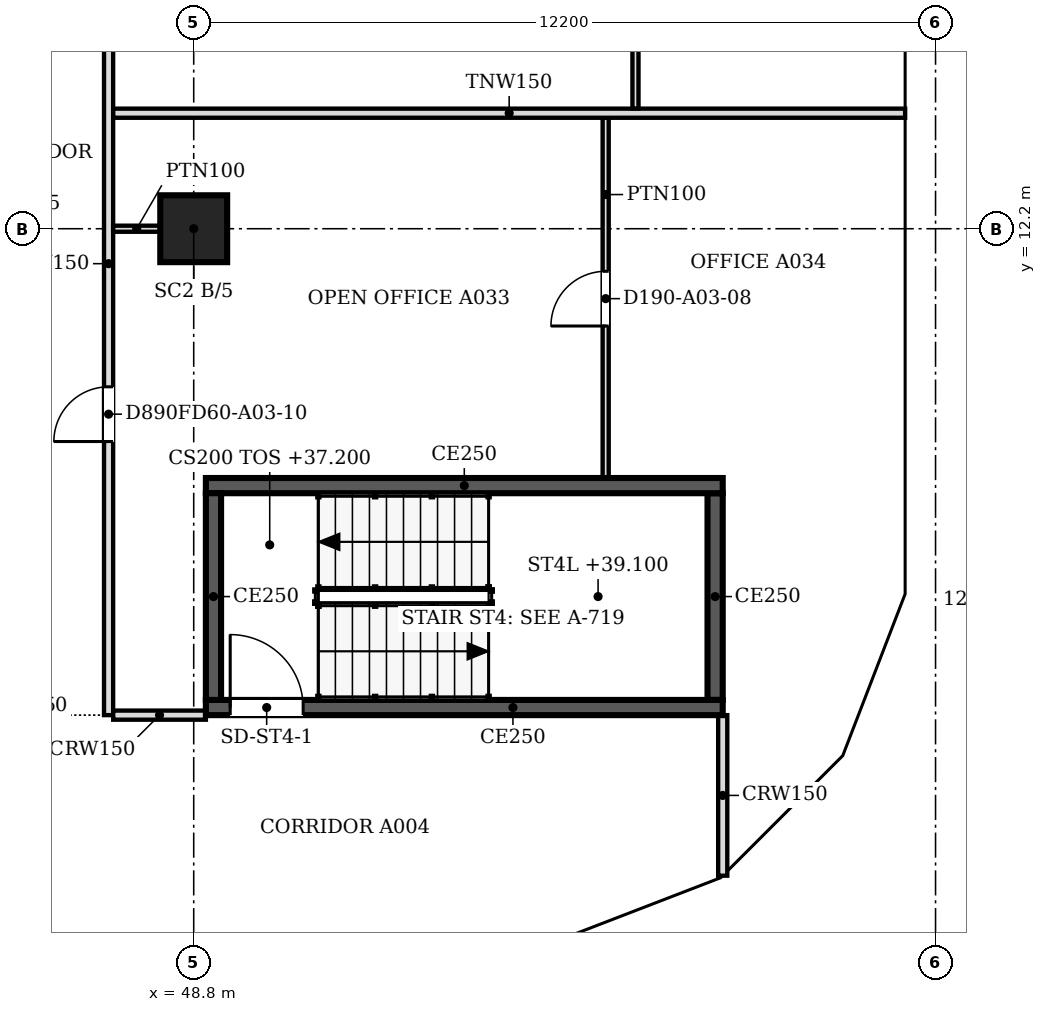
"""IFC4 building model, lengths in metres.
Left out: names, types, materials, properties, quantities, classifications, styles, units other than length and angle.
Written with IfcOpenShell. Run it as: python <this file> out.ifc"""

import sys

from ifc_helpers import new_model, si_unit, direction, frame, frame_2d, origin, origin_2d, place, context, subcontext, project, spatial, polyline, rectangle, outline, extrude, faceted_brep, source, transform, mapped, element, fill, save


model = new_model("IFC4")
c1 = context("Model", 3, precision=1e-05, world=origin(), true_north=direction((0.0, 1.0)))
c2 = subcontext(c1, "Body", "Model", "MODEL_VIEW")
j1 = project(units=[si_unit("LENGTHUNIT", "METRE"), si_unit("PLANEANGLEUNIT", "RADIAN")], contexts=[c1])
p1 = place(None, origin())
s1 = spatial("IfcSite", under=j1, at=p1, CompositionType="ELEMENT")
p2 = place(p1, origin())
s2 = spatial("IfcBuilding", under=s1, at=p2, CompositionType="ELEMENT")
p3 = place(p2, frame((0.0, 0.0, 37.2)))
s3 = spatial("IfcBuildingStorey", under=s2, at=p3, CompositionType="ELEMENT", Elevation=37.2)
p4 = place(p3, frame((48.8, 12.2, 0.0), z_axis=(0.0, 0.0, 1.0), x_axis=(1.0, 0.0, 0.0)))
e1 = element("IfcColumn", 1, at=p4, inside=s3, PredefinedType="COLUMN", context=c2, shape_type="SweptSolid", body=[
    extrude(rectangle(XDim=1.1, YDim=1.1, at=origin_2d()), origin(), (0.0, 0.0, 1.0), 3.6),
])
m1 = source(origin(), c2, "Body", "Brep", [
    faceted_brep([(2.95, -0.25, 0.0), (3.003, -0.25, 0.068), (3.003, -0.25, 7.532), (2.95, -0.25, 7.6), (0.0, -0.25, 3.8), (0.047, 0.25, 3.86), (2.898, 0.25, 7.532), (2.898, 0.25, 0.068), (0.047, 0.25, 3.74), (2.95, 0.0, 0.0), (2.95, 0.0, 7.6), (0.0, 0.0, 3.8)], [[[0, 1, 2, 3, 4]], [[5, 6, 7, 8]], [[1, 0, 9]], [[10, 3, 2]], [[6, 5, 11, 4, 3, 10]], [[8, 7, 9, 0, 4, 11]], [[8, 11, 5]], [[1, 9, 7, 6, 10, 2]]]),
])
p5 = place(p3, frame((54.854, 0.25, -3.8), z_axis=(0.0, 0.0, 1.0), x_axis=(0.932970071518, 0.359953949349, 0.0)))
e2 = element("IfcWall", 2, at=p5, inside=s3, PredefinedType="SOLIDWALL", context=c2, shape_type="MappedRepresentation", body=[
    mapped(m1, transform((0.0, 0.0, 0.0), scale=1.0)),
])
m2 = source(origin(), c2, "Body", "SweptSolid", [
    extrude(outline(polyline([(2.75, 6.935), (0.316, 3.8), (2.75, 0.665), (2.75, 6.935)])), frame((0.0, 0.26, 0.0), z_axis=(0.0, -1.0, 0.0), x_axis=(1.0, 0.0, 0.0)), (0.0, 0.0, 1.0), 0.52),
])
p6 = place(p5, origin())
e3 = element("IfcOpeningElement", 3, at=p6, cuts=e2, PredefinedType="OPENING", context=c2, shape_type="MappedRepresentation", body=[
    mapped(m2, transform((0.0, 0.0, 0.0), scale=1.0)),
])
m3 = source(origin(), c2, "Body", "Brep", [
    faceted_brep([(0.053, -0.25, 0.0), (2.997, -0.25, 3.8), (0.053, -0.25, 7.6), (0.0, -0.25, 7.532), (0.0, -0.25, 0.068), (0.106, 0.25, 7.532), (2.944, 0.25, 3.868), (2.944, 0.25, 3.732), (0.106, 0.25, 0.068), (2.997, 0.0, 3.8), (0.053, 0.0, 0.0), (0.053, 0.0, 7.6)], [[[0, 1, 2, 3, 4]], [[5, 6, 7, 8]], [[8, 7, 9, 1, 0, 10]], [[6, 5, 11, 2, 1, 9]], [[3, 2, 11]], [[10, 0, 4]], [[8, 10, 4, 3, 11, 5]], [[9, 7, 6]]]),
])
p7 = place(p3, frame((57.569, 1.274, -3.8), z_axis=(0.0, 0.0, 1.0), x_axis=(0.707066050402, 0.707147509625, 0.0)))
e4 = element("IfcWall", 4, at=p7, inside=s3, PredefinedType="SOLIDWALL", context=c2, shape_type="MappedRepresentation", body=[
    mapped(m3, transform((0.0, 0.0, 0.0), scale=1.0)),
])
m4 = source(origin(), c2, "Body", "SweptSolid", [
    extrude(outline(polyline([(0.253, 0.667), (2.681, 3.8), (0.253, 6.934), (0.253, 0.667)])), frame((0.0, 0.26, 0.0), z_axis=(0.0, -1.0, 0.0), x_axis=(1.0, 0.0, 0.0)), (0.0, 0.0, 1.0), 0.52),
])
p8 = place(p7, origin())
e5 = element("IfcOpeningElement", 5, at=p8, cuts=e4, PredefinedType="OPENING", context=c2, shape_type="MappedRepresentation", body=[
    mapped(m4, transform((0.0, 0.0, 0.0), scale=1.0)),
])
m5 = source(origin(), c2, "Body", "Brep", [
    faceted_brep([(2.95, -0.25, 0.0), (2.997, -0.25, 0.059), (2.997, -0.25, 7.541), (2.95, -0.25, 7.6), (0.0, -0.25, 3.8), (0.053, 0.25, 3.868), (2.904, 0.25, 7.54), (2.904, 0.25, 0.06), (0.053, 0.25, 3.732), (2.95, 0.0, 0.0), (2.95, 0.0, 7.6), (0.0, 0.0, 3.8)], [[[0, 1, 2, 3, 4]], [[5, 6, 7, 8]], [[1, 0, 9]], [[10, 3, 2]], [[6, 5, 11, 4, 3, 10]], [[8, 7, 9, 0, 4, 11]], [[8, 11, 5]], [[1, 9, 7, 6, 10, 2]]]),
])
p9 = place(p3, frame((59.688, 3.394, -3.8), z_axis=(0.0, 0.0, 1.0), x_axis=(0.359972353723, 0.932962970624, 0.0)))
e6 = element("IfcWall", 6, at=p9, inside=s3, PredefinedType="SOLIDWALL", context=c2, shape_type="MappedRepresentation", body=[
    mapped(m5, transform((0.0, 0.0, 0.0), scale=1.0)),
])
p10 = place(p9, origin())
e7 = element("IfcOpeningElement", 7, at=p10, cuts=e6, PredefinedType="OPENING", context=c2, shape_type="MappedRepresentation", body=[
    mapped(m2, transform((0.0, 0.0, 0.0), scale=1.0)),
])
m6 = source(origin(), c2, "Body", "Brep", [
    faceted_brep([(0.047, -0.25, 0.0), (3.05, -0.25, 3.8), (0.047, -0.25, 7.6), (0.0, -0.25, 7.54), (0.0, -0.25, 0.06), (0.093, 0.25, 7.541), (3.05, 0.25, 3.8), (0.093, 0.25, 0.059), (0.047, 0.0, 0.0), (0.047, 0.0, 7.6)], [[[0, 1, 2, 3, 4]], [[5, 6, 7]], [[7, 6, 1, 0, 8]], [[6, 5, 9, 2, 1]], [[3, 2, 9]], [[8, 0, 4]], [[7, 8, 4, 3, 9, 5]]]),
])
p11 = place(p3, frame((60.75, 6.1, -3.8), z_axis=(0.0, 0.0, 1.0), x_axis=(0.0, 1.0, 0.0)))
e8 = element("IfcWall", 8, at=p11, inside=s3, PredefinedType="SOLIDWALL", context=c2, shape_type="MappedRepresentation", body=[
    mapped(m6, transform((0.0, 0.0, 0.0), scale=1.0)),
])
m7 = source(origin(), c2, "Body", "SweptSolid", [
    extrude(outline(polyline([(0.247, 0.656), (2.731, 3.8), (0.247, 6.944), (0.247, 0.656)])), frame((0.0, 0.26, 0.0), z_axis=(0.0, -1.0, 0.0), x_axis=(1.0, 0.0, 0.0)), (0.0, 0.0, 1.0), 0.52),
])
p12 = place(p11, origin())
e9 = element("IfcOpeningElement", 9, at=p12, cuts=e8, PredefinedType="OPENING", context=c2, shape_type="MappedRepresentation", body=[
    mapped(m7, transform((0.0, 0.0, 0.0), scale=1.0)),
])
m8 = source(origin(), c2, "Body", "SweptSolid", [
    extrude(outline(polyline([(3.05, 0.0), (6.1, 3.8), (3.05, 7.6), (0.0, 3.8), (3.05, 0.0)])), frame((0.0, 0.25, 0.0), z_axis=(0.0, -1.0, 0.0), x_axis=(1.0, 0.0, 0.0)), (0.0, 0.0, 1.0), 0.5),
])
p13 = place(p3, frame((60.75, 9.15, -3.8), z_axis=(0.0, 0.0, 1.0), x_axis=(0.0, 1.0, 0.0)))
e10 = element("IfcWall", 10, at=p13, inside=s3, PredefinedType="SOLIDWALL", context=c2, shape_type="MappedRepresentation", body=[
    mapped(m8, transform((0.0, 0.0, 0.0), scale=1.0)),
])
m9 = source(origin(), c2, "Body", "SweptSolid", [
    extrude(outline(polyline([(3.05, 0.399), (5.78, 3.8), (3.05, 7.201), (0.321, 3.8), (3.05, 0.399)])), frame((0.0, 0.26, 0.0), z_axis=(0.0, -1.0, 0.0), x_axis=(1.0, 0.0, 0.0)), (0.0, 0.0, 1.0), 0.52),
])
p14 = place(p13, origin())
e11 = element("IfcOpeningElement", 11, at=p14, cuts=e10, PredefinedType="OPENING", context=c2, shape_type="MappedRepresentation", body=[
    mapped(m9, transform((0.0, 0.0, 0.0), scale=1.0)),
])
p15 = place(p2, frame((0.0, 0.0, 41.0)))
s4 = spatial("IfcBuildingStorey", under=s2, at=p15, CompositionType="ELEMENT", Elevation=41.0)
m10 = source(origin(), c2, "Body", "Brep", [
    faceted_brep([(0.047, -0.25, 0.0), (2.997, -0.25, 3.8), (0.047, -0.25, 7.6), (0.0, -0.25, 7.541), (0.0, -0.25, 0.059), (0.093, 0.25, 7.54), (2.944, 0.25, 3.868), (2.944, 0.25, 3.732), (0.093, 0.25, 0.06), (2.997, 0.0, 3.8), (0.047, 0.0, 0.0), (0.047, 0.0, 7.6)], [[[0, 1, 2, 3, 4]], [[5, 6, 7, 8]], [[8, 7, 9, 1, 0, 10]], [[6, 5, 11, 2, 1, 9]], [[3, 2, 11]], [[10, 0, 4]], [[8, 10, 4, 3, 11, 5]], [[9, 7, 6]]]),
])
p16 = place(p15, frame((54.81, 0.233, -3.8), z_axis=(0.0, 0.0, 1.0), x_axis=(0.932990326376, 0.359901446078, 0.0)))
e12 = element("IfcWall", 12, at=p16, inside=s4, PredefinedType="SOLIDWALL", context=c2, shape_type="MappedRepresentation", body=[
    mapped(m10, transform((0.0, 0.0, 0.0), scale=1.0)),
])
m11 = source(origin(), c2, "Body", "SweptSolid", [
    extrude(outline(polyline([(0.247, 0.665), (2.681, 3.8), (0.247, 6.935), (0.247, 0.665)])), frame((0.0, 0.26, 0.0), z_axis=(0.0, -1.0, 0.0), x_axis=(1.0, 0.0, 0.0)), (0.0, 0.0, 1.0), 0.52),
])
p17 = place(p16, origin())
e13 = element("IfcOpeningElement", 13, at=p17, cuts=e12, PredefinedType="OPENING", context=c2, shape_type="MappedRepresentation", body=[
    mapped(m11, transform((0.0, 0.0, 0.0), scale=1.0)),
])
m12 = source(origin(), c2, "Body", "Brep", [
    faceted_brep([(2.944, -0.25, 0.0), (2.997, -0.25, 0.068), (2.997, -0.25, 7.532), (2.944, -0.25, 7.6), (0.0, -0.25, 3.8), (0.053, 0.25, 3.868), (2.891, 0.25, 7.532), (2.891, 0.25, 0.068), (0.053, 0.25, 3.732), (2.944, 0.0, 0.0), (2.944, 0.0, 7.6), (0.0, 0.0, 3.8)], [[[0, 1, 2, 3, 4]], [[5, 6, 7, 8]], [[1, 0, 9]], [[10, 3, 2]], [[6, 5, 11, 4, 3, 10]], [[8, 7, 9, 0, 4, 11]], [[8, 11, 5]], [[1, 9, 7, 6, 10, 2]]]),
])
p18 = place(p15, frame((57.606, 1.312, -3.8), z_axis=(0.0, 0.0, 1.0), x_axis=(0.707147509625, 0.707066050402, 0.0)))
e14 = element("IfcWall", 14, at=p18, inside=s4, PredefinedType="SOLIDWALL", context=c2, shape_type="MappedRepresentation", body=[
    mapped(m12, transform((0.0, 0.0, 0.0), scale=1.0)),
])
m13 = source(origin(), c2, "Body", "SweptSolid", [
    extrude(outline(polyline([(2.744, 6.934), (0.316, 3.8), (2.744, 0.666), (2.744, 6.934)])), frame((0.0, 0.26, 0.0), z_axis=(0.0, -1.0, 0.0), x_axis=(1.0, 0.0, 0.0)), (0.0, 0.0, 1.0), 0.52),
])
p19 = place(p18, origin())
e15 = element("IfcOpeningElement", 15, at=p19, cuts=e14, PredefinedType="OPENING", context=c2, shape_type="MappedRepresentation", body=[
    mapped(m13, transform((0.0, 0.0, 0.0), scale=1.0)),
])
m14 = source(origin(), c2, "Body", "Brep", [
    faceted_brep([(0.053, -0.25, 0.0), (3.003, -0.25, 3.8), (0.053, -0.25, 7.6), (0.0, -0.25, 7.532), (0.0, -0.25, 0.068), (0.106, 0.25, 7.532), (2.957, 0.25, 3.86), (2.957, 0.25, 3.74), (0.106, 0.25, 0.068), (3.003, 0.0, 3.8), (0.053, 0.0, 0.0), (0.053, 0.0, 7.6)], [[[0, 1, 2, 3, 4]], [[5, 6, 7, 8]], [[8, 7, 9, 1, 0, 10]], [[6, 5, 11, 2, 1, 9]], [[3, 2, 11]], [[10, 0, 4]], [[8, 10, 4, 3, 11, 5]], [[9, 7, 6]]]),
])
p20 = place(p15, frame((59.669, 3.344, -3.8), z_axis=(0.0, 0.0, 1.0), x_axis=(0.35992665181, 0.932980602862, 0.0)))
e16 = element("IfcWall", 16, at=p20, inside=s4, PredefinedType="SOLIDWALL", context=c2, shape_type="MappedRepresentation", body=[
    mapped(m14, transform((0.0, 0.0, 0.0), scale=1.0)),
])
m15 = source(origin(), c2, "Body", "SweptSolid", [
    extrude(outline(polyline([(0.253, 0.665), (2.687, 3.8), (0.253, 6.935), (0.253, 0.665)])), frame((0.0, 0.26, 0.0), z_axis=(0.0, -1.0, 0.0), x_axis=(1.0, 0.0, 0.0)), (0.0, 0.0, 1.0), 0.52),
])
p21 = place(p20, origin())
e17 = element("IfcOpeningElement", 17, at=p21, cuts=e16, PredefinedType="OPENING", context=c2, shape_type="MappedRepresentation", body=[
    mapped(m15, transform((0.0, 0.0, 0.0), scale=1.0)),
])
m16 = source(origin(), c2, "Body", "Brep", [
    faceted_brep([(3.003, -0.25, 0.0), (6.053, -0.25, 3.8), (3.003, -0.25, 7.6), (0.0, -0.25, 3.8), (0.047, 0.25, 3.859), (3.003, 0.25, 7.6), (6.053, 0.25, 3.8), (3.003, 0.25, 0.0), (0.047, 0.25, 3.741), (0.0, 0.0, 3.8)], [[[0, 1, 2, 3]], [[4, 5, 6, 7, 8]], [[7, 6, 1, 0]], [[6, 5, 2, 1]], [[5, 4, 9, 3, 2]], [[8, 7, 0, 3, 9]], [[8, 9, 4]]]),
])
p22 = place(p15, frame((60.75, 6.146, -3.8), z_axis=(0.0, 0.0, 1.0), x_axis=(0.0, 1.0, 0.0)))
e18 = element("IfcWall", 18, at=p22, inside=s4, PredefinedType="SOLIDWALL", context=c2, shape_type="MappedRepresentation", body=[
    mapped(m16, transform((0.0, 0.0, 0.0), scale=1.0)),
])
m17 = source(origin(), c2, "Body", "SweptSolid", [
    extrude(outline(polyline([(3.005, 0.401), (5.733, 3.8), (3.005, 7.199), (0.319, 3.8), (3.005, 0.401)])), frame((0.0, 0.26, 0.0), z_axis=(0.0, -1.0, 0.0), x_axis=(1.0, 0.0, 0.0)), (0.0, 0.0, 1.0), 0.52),
])
p23 = place(p22, origin())
e19 = element("IfcOpeningElement", 19, at=p23, cuts=e18, PredefinedType="OPENING", context=c2, shape_type="MappedRepresentation", body=[
    mapped(m17, transform((0.0, 0.0, 0.0), scale=1.0)),
])
p24 = place(p15, frame((60.75, 12.2, -3.8), z_axis=(0.0, 0.0, 1.0), x_axis=(0.0, 1.0, 0.0)))
e20 = element("IfcWall", 20, at=p24, inside=s4, PredefinedType="SOLIDWALL", context=c2, shape_type="MappedRepresentation", body=[
    mapped(m8, transform((0.0, 0.0, 0.0), scale=1.0)),
])
p25 = place(p24, origin())
e21 = element("IfcOpeningElement", 21, at=p25, cuts=e20, PredefinedType="OPENING", context=c2, shape_type="MappedRepresentation", body=[
    mapped(m9, transform((0.0, 0.0, 0.0), scale=1.0)),
])
p26 = place(p3, frame((57.5, 4.325, 0.0), z_axis=(0.0, 0.0, 1.0), x_axis=(-1.0, 0.0, 0.0)))
e22 = element("IfcWall", 22, at=p26, inside=s3, PredefinedType="SOLIDWALL", context=c2, shape_type="SweptSolid", body=[
    extrude(rectangle(XDim=8.5, YDim=0.25, at=frame_2d((4.25, 0.0))), origin(), (0.0, 0.0, 1.0), 3.8),
])
m18 = source(origin(), c2, "Body", "SweptSolid", [
    extrude(rectangle(XDim=1.2, YDim=2.1, at=frame_2d((0.6, 1.05))), frame((0.0, 0.135, 0.0), z_axis=(0.0, -1.0, 0.0), x_axis=(1.0, 0.0, 0.0)), (0.0, 0.0, 1.0), 0.27),
])
p27 = place(p26, frame((6.9, 0.0, 0.0)))
e23 = element("IfcOpeningElement", 23, at=p27, cuts=e22, PredefinedType="OPENING", context=c2, shape_type="MappedRepresentation", body=[
    mapped(m18, transform((0.0, 0.0, 0.0), scale=1.0)),
])
p28 = place(p3, frame((49.125, 4.45, 0.0), z_axis=(0.0, 0.0, 1.0), x_axis=(0.0, 1.0, 0.0)))
e24 = element("IfcWall", 24, at=p28, inside=s3, PredefinedType="SOLIDWALL", context=c2, shape_type="SweptSolid", body=[
    extrude(rectangle(XDim=3.4, YDim=0.25, at=frame_2d((1.7, 0.0))), origin(), (0.0, 0.0, 1.0), 3.8),
])
p29 = place(p3, frame((49.0, 7.975, 0.0), z_axis=(0.0, 0.0, 1.0), x_axis=(1.0, 0.0, 0.0)))
e25 = element("IfcWall", 25, at=p29, inside=s3, PredefinedType="SOLIDWALL", context=c2, shape_type="SweptSolid", body=[
    extrude(rectangle(XDim=8.5, YDim=0.25, at=frame_2d((4.25, 0.0))), origin(), (0.0, 0.0, 1.0), 3.8),
])
p30 = place(p3, frame((57.375, 7.85, 0.0), z_axis=(0.0, 0.0, 1.0), x_axis=(0.0, -1.0, 0.0)))
e26 = element("IfcWall", 26, at=p30, inside=s3, PredefinedType="SOLIDWALL", context=c2, shape_type="SweptSolid", body=[
    extrude(rectangle(XDim=3.4, YDim=0.25, at=frame_2d((1.7, 0.0))), origin(), (0.0, 0.0, 1.0), 3.8),
])
p31 = place(p3, frame((57.5, 1.559, 0.0), z_axis=(0.0, 0.0, 1.0), x_axis=(0.0, 1.0, 0.0)))
e27 = element("IfcWall", 27, at=p31, inside=s3, PredefinedType="PARTITIONING", context=c2, shape_type="SweptSolid", body=[
    extrude(rectangle(XDim=2.641, YDim=0.15, at=frame_2d((1.32, 0.0))), origin(), (0.0, 0.0, 1.0), 3.067),
])
p32 = place(p3, frame((47.4, 22.224, 0.0), z_axis=(0.0, 0.0, 1.0), x_axis=(0.0, -1.0, 0.0)))
e28 = element("IfcWall", 28, at=p32, inside=s3, PredefinedType="PARTITIONING", context=c2, shape_type="SweptSolid", body=[
    extrude(rectangle(XDim=18.024, YDim=0.15, at=frame_2d((9.012, 0.0))), origin(), (0.0, 0.0, 1.0), 3.067),
])
m19 = source(origin(), c2, "Body", "SweptSolid", [
    extrude(rectangle(XDim=0.9, YDim=2.1, at=frame_2d((0.45, 1.05))), frame((0.0, 0.085, 0.0), z_axis=(0.0, -1.0, 0.0), x_axis=(1.0, 0.0, 0.0)), (0.0, 0.0, 1.0), 0.17),
])
p33 = place(p32, frame((3.623, 0.0, 0.0)))
e29 = element("IfcOpeningElement", 29, at=p33, cuts=e28, PredefinedType="OPENING", context=c2, shape_type="MappedRepresentation", body=[
    mapped(m19, transform((0.0, 0.0, 0.0), scale=1.0)),
])
p34 = place(p32, frame((12.624, 0.0, 0.0)))
e30 = element("IfcOpeningElement", 30, at=p34, cuts=e28, PredefinedType="OPENING", context=c2, shape_type="MappedRepresentation", body=[
    mapped(m19, transform((0.0, 0.0, 0.0), scale=1.0)),
])
p35 = place(p3, frame((47.476, 4.2, 0.0), z_axis=(0.0, 0.0, 1.0), x_axis=(1.0, 0.0, 0.0)))
e31 = element("IfcWall", 31, at=p35, inside=s3, PredefinedType="PARTITIONING", context=c2, shape_type="SweptSolid", body=[
    extrude(rectangle(XDim=1.524, YDim=0.15, at=frame_2d((0.762, 0.0))), origin(), (0.0, 0.0, 1.0), 3.067),
])
p36 = place(p3, frame((55.575, 14.024, 0.0), z_axis=(0.0, 0.0, 1.0), x_axis=(0.0, -1.0, 0.0)))
e32 = element("IfcWall", 32, at=p36, inside=s3, PredefinedType="PARTITIONING", context=c2, shape_type="SweptSolid", body=[
    extrude(rectangle(XDim=5.924, YDim=0.1, at=frame_2d((2.962, 0.0))), origin(), (0.0, 0.0, 1.0), 3.067),
])
m20 = source(origin(), c2, "Body", "SweptSolid", [
    extrude(rectangle(XDim=0.9, YDim=2.1, at=frame_2d((0.45, 1.05))), frame((0.0, 0.06, 0.0), z_axis=(0.0, -1.0, 0.0), x_axis=(1.0, 0.0, 0.0)), (0.0, 0.0, 1.0), 0.12),
])
p37 = place(p36, frame((2.524, 0.0, 0.0)))
e33 = element("IfcOpeningElement", 33, at=p37, cuts=e32, PredefinedType="OPENING", context=c2, shape_type="MappedRepresentation", body=[
    mapped(m20, transform((0.0, 0.0, 0.0), scale=1.0)),
])
p38 = place(p3, frame((48.25, 12.2, 0.0), z_axis=(0.0, 0.0, 1.0), x_axis=(-1.0, 0.0, 0.0)))
e34 = element("IfcWall", 34, at=p38, inside=s3, PredefinedType="PARTITIONING", context=c2, shape_type="SweptSolid", body=[
    extrude(rectangle(XDim=0.775, YDim=0.1, at=frame_2d((0.387, 0.0))), origin(), (0.0, 0.0, 1.0), 3.067),
])
p39 = place(p3, frame((47.476, 14.1, 0.0), z_axis=(0.0, 0.0, 1.0), x_axis=(1.0, 0.0, 0.0)))
e35 = element("IfcWall", 35, at=p39, inside=s3, PredefinedType="PARTITIONING", context=c2, shape_type="SweptSolid", body=[
    extrude(rectangle(XDim=13.024, YDim=0.15, at=frame_2d((6.512, 0.0))), origin(), (0.0, 0.0, 1.0), 3.067),
])
p40 = place(p3, frame((56.065, 22.224, 0.0), z_axis=(0.0, 0.0, 1.0), x_axis=(0.0, -1.0, 0.0)))
e36 = element("IfcWall", 36, at=p40, inside=s3, PredefinedType="PARTITIONING", context=c2, shape_type="SweptSolid", body=[
    extrude(rectangle(XDim=8.048, YDim=0.1, at=frame_2d((4.024, 0.0))), origin(), (0.0, 0.0, 1.0), 3.067),
])
p41 = place(p40, frame((3.548, 0.0, 0.0)))
e37 = element("IfcOpeningElement", 37, at=p41, cuts=e36, PredefinedType="OPENING", context=c2, shape_type="MappedRepresentation", body=[
    mapped(m20, transform((0.0, 0.0, 0.0), scale=1.0)),
])
m21 = source(origin(), c2, "Body", "SweptSolid", [
    extrude(rectangle(XDim=1.2, YDim=2.1, at=frame_2d((0.6, 1.05))), frame((0.0, 0.025, 0.0), z_axis=(0.0, -1.0, 0.0), x_axis=(1.0, 0.0, 0.0)), (0.0, 0.0, 1.0), 0.05),
])
p42 = place(p27, origin())
e38 = element("IfcDoor", 38, at=p42, inside=s3, OperationType="SINGLE_SWING_RIGHT", PredefinedType="DOOR", context=c2, shape_type="MappedRepresentation", body=[
    mapped(m21, transform((0.0, 0.0, 0.0), scale=1.0)),
])
fill(e23, e38)
m22 = source(origin(), c2, "Body", "SweptSolid", [
    extrude(rectangle(XDim=0.9, YDim=2.1, at=frame_2d((0.45, 1.05))), frame((0.0, 0.025, 0.0), z_axis=(0.0, -1.0, 0.0), x_axis=(1.0, 0.0, 0.0)), (0.0, 0.0, 1.0), 0.05),
])
p43 = place(p37, origin())
e39 = element("IfcDoor", 39, at=p43, inside=s3, OperationType="SINGLE_SWING_RIGHT", PredefinedType="DOOR", context=c2, shape_type="MappedRepresentation", body=[
    mapped(m22, transform((0.0, 0.0, 0.0), scale=1.0)),
])
fill(e33, e39)
p44 = place(p34, origin())
e40 = element("IfcDoor", 40, at=p44, inside=s3, OperationType="SINGLE_SWING_RIGHT", PredefinedType="DOOR", context=c2, shape_type="MappedRepresentation", body=[
    mapped(m22, transform((0.0, 0.0, 0.0), scale=1.0)),
])
fill(e30, e40)
save(model, sys.argv[1])
